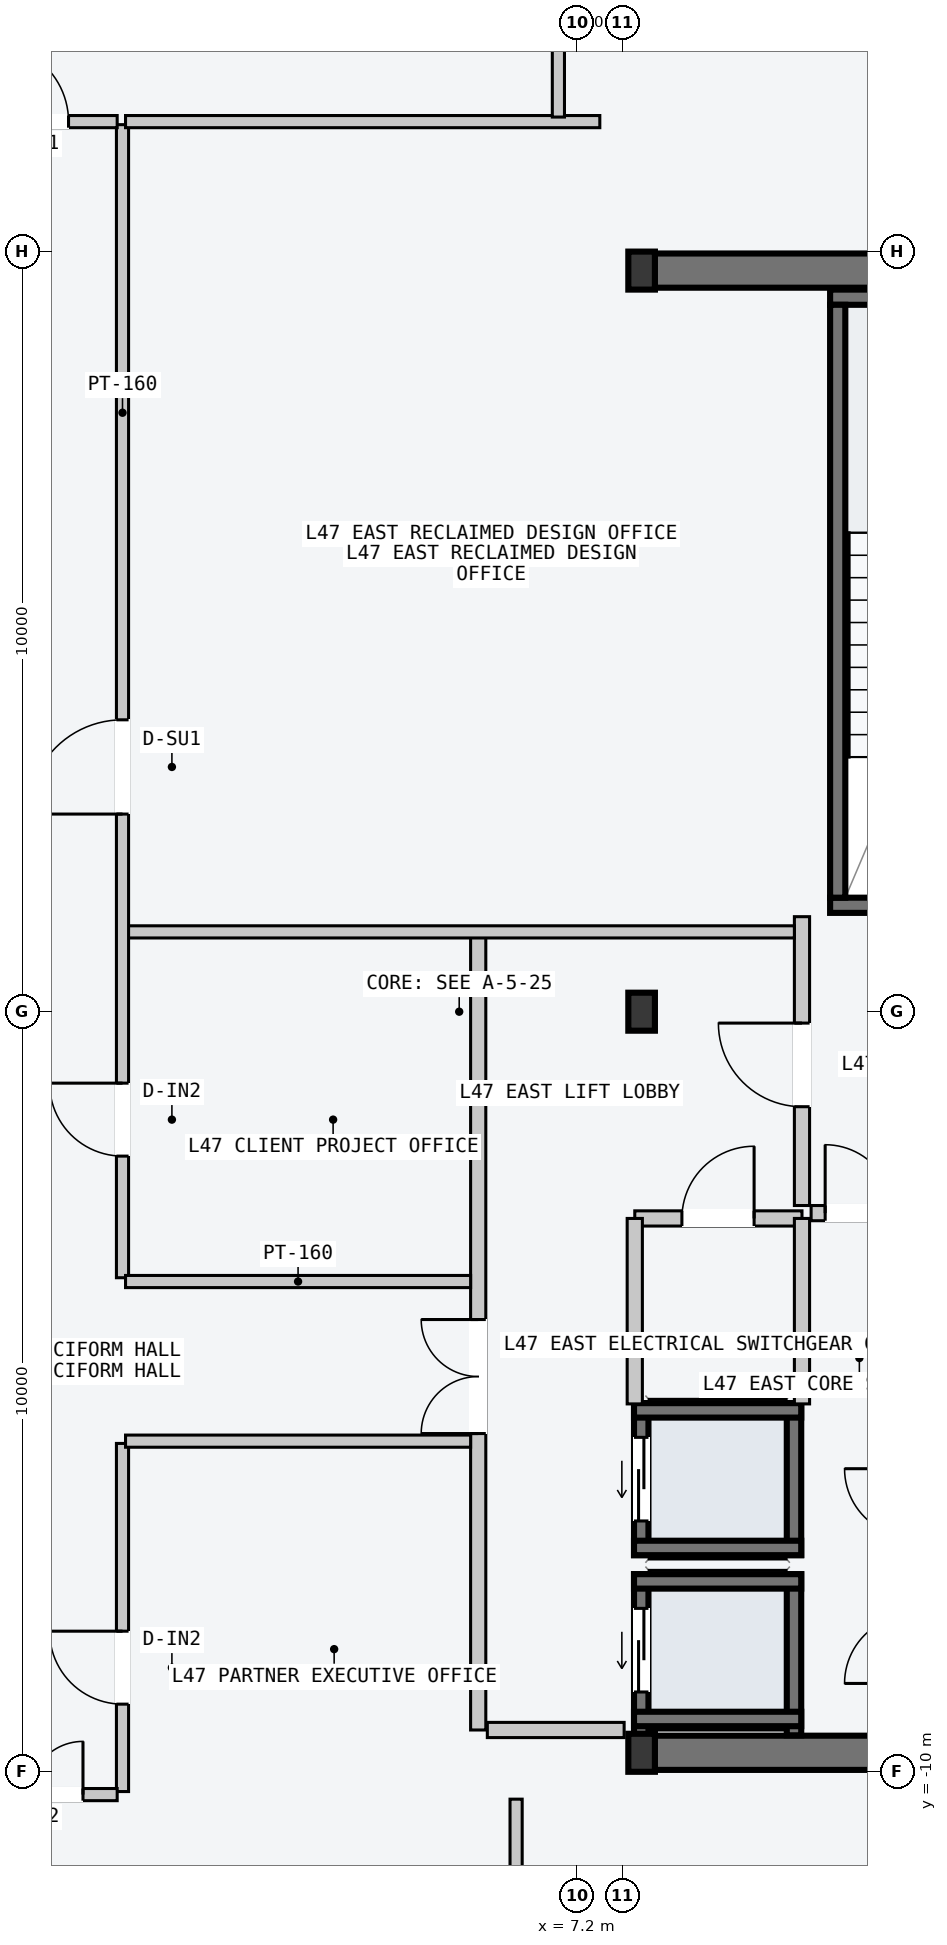
"""IFC4 building model, lengths in metres.
Left out: names, types, materials, properties, quantities, classifications, styles, units other than length and angle.
Written with IfcOpenShell. Run it as: python <this file> out.ifc"""

import sys

from ifc_helpers import new_model, si_unit, direction, frame, frame_2d, origin, origin_2d, place, context, subcontext, project, spatial, rectangle, i_section, extrude, element, fill, save


model = new_model("IFC4")
c1 = context("Model", 3, precision=1e-05, world=origin(), true_north=direction((0.0, 1.0)))
c2 = subcontext(c1, "Body", "Model", "MODEL_VIEW")
j1 = project(units=[si_unit("LENGTHUNIT", "METRE"), si_unit("PLANEANGLEUNIT", "RADIAN")], contexts=[c1])
p1 = place(None, origin())
s1 = spatial("IfcSite", under=j1, at=p1, CompositionType="ELEMENT")
p2 = place(p1, origin())
s2 = spatial("IfcBuilding", under=s1, at=p2, CompositionType="ELEMENT")
p3 = place(p2, frame((0.0, 0.0, 180.3)))
s3 = spatial("IfcBuildingStorey", under=s2, at=p3, CompositionType="ELEMENT", Elevation=180.3)
for number, where, z_axis, x_axis in (
    (1, (8.07, -9.75, -0.2), (0.0, 0.0, 1.0), (1.0, 0.0, 0.0)),
    (2, (8.07, 9.75, -0.2), (0.0, 0.0, 1.0), (1.0, 0.0, 0.0)),
):
    element("IfcWall", number, at=place(p3, frame(where, z_axis=z_axis, x_axis=x_axis)), inside=s3, PredefinedType="SHEAR", context=c2, shape_type="SweptSolid", body=[
        extrude(rectangle(XDim=6.46, YDim=0.45, at=frame_2d((3.23, 0.0))), origin(), (0.0, 0.0, 1.0), 3.6),
    ])
p4 = place(p3, frame((10.53, 1.4, -0.2), z_axis=(0.0, 0.0, 1.0), x_axis=(1.0, 0.0, 0.0)))
e3 = element("IfcWall", 3, at=p4, inside=s3, PredefinedType="SOLIDWALL", context=c2, shape_type="SweptSolid", body=[
    extrude(rectangle(XDim=3.72, YDim=0.2, at=frame_2d((1.86, 0.0))), origin(), (0.0, 0.0, 1.0), 3.6),
])
p5 = place(p4, frame((1.5, 0.0, 0.2)))
e4 = element("IfcOpeningElement", 4, at=p5, cuts=e3, PredefinedType="OPENING", context=c2, shape_type="SweptSolid", body=[
    extrude(rectangle(XDim=1.12, YDim=2.18, at=frame_2d((0.56, 1.09))), frame((0.0, 0.11, 0.0), z_axis=(0.0, -1.0, 0.0), x_axis=(1.0, 0.0, 0.0)), (0.0, 0.0, 1.0), 0.22),
])
p6 = place(p3, frame((10.53, 9.4, -0.2), z_axis=(0.0, 0.0, 1.0), x_axis=(1.0, 0.0, 0.0)))
e5 = element("IfcWall", 5, at=p6, inside=s3, PredefinedType="SOLIDWALL", context=c2, shape_type="SweptSolid", body=[
    extrude(rectangle(XDim=3.72, YDim=0.2, at=frame_2d((1.86, 0.0))), origin(), (0.0, 0.0, 1.0), 3.6),
])
p7 = place(p3, frame((10.63, 1.5, -0.2), z_axis=(0.0, 0.0, 1.0), x_axis=(0.0, 1.0, 0.0)))
e6 = element("IfcWall", 6, at=p7, inside=s3, PredefinedType="SOLIDWALL", context=c2, shape_type="SweptSolid", body=[
    extrude(rectangle(XDim=7.8, YDim=0.2, at=frame_2d((3.9, 0.0))), origin(), (0.0, 0.0, 1.0), 3.6),
])
for number, where, z_axis, x_axis in (
    (7, (8.05, -9.75, 0.0), (0.0, 0.0, 1.0), (1.0, 0.0, 0.0)),
    (8, (8.05, 0.0, 0.0), (0.0, 0.0, 1.0), (1.0, 0.0, 0.0)),
    (9, (8.05, 9.75, 0.0), (0.0, 0.0, 1.0), (1.0, 0.0, 0.0)),
):
    element("IfcColumn", number, at=place(p3, frame(where, z_axis=z_axis, x_axis=x_axis)), inside=s3, PredefinedType="COLUMN", context=c2, shape_type="SweptSolid", body=[
        extrude(i_section(OverallWidth=0.35, OverallDepth=0.5, WebThickness=0.02, FlangeThickness=0.032, at=origin_2d()), origin(), (0.0, 0.0, 1.0), 3.6),
    ])
p8 = place(p3, frame((8.045, -9.52, -0.2), z_axis=(0.0, 0.0, 1.0), x_axis=(0.0, 1.0, 0.0)))
e10 = element("IfcWall", 10, at=p8, inside=s3, PredefinedType="SOLIDWALL", context=c2, shape_type="SweptSolid", body=[
    extrude(rectangle(XDim=2.12, YDim=0.19, at=frame_2d((1.06, 0.0))), origin(), (0.0, 0.0, 1.0), 3.6),
])
p9 = place(p8, frame((0.57, 0.0, 0.2)))
e11 = element("IfcOpeningElement", 11, at=p9, cuts=e10, PredefinedType="OPENING", context=c2, shape_type="SweptSolid", body=[
    extrude(rectangle(XDim=1.1, YDim=2.2, at=frame_2d((0.55, 1.1))), frame((0.0, 0.105, 0.0), z_axis=(0.0, -1.0, 0.0), x_axis=(1.0, 0.0, 0.0)), (0.0, 0.0, 1.0), 0.21),
])
p10 = place(p3, frame((10.055, -9.52, -0.2), z_axis=(0.0, 0.0, 1.0), x_axis=(0.0, 1.0, 0.0)))
e12 = element("IfcWall", 12, at=p10, inside=s3, PredefinedType="SOLIDWALL", context=c2, shape_type="SweptSolid", body=[
    extrude(rectangle(XDim=2.12, YDim=0.19, at=frame_2d((1.06, 0.0))), origin(), (0.0, 0.0, 1.0), 3.6),
])
for number, where, z_axis, x_axis in (
    (13, (7.95, -7.495, -0.2), (0.0, 0.0, 1.0), (1.0, 0.0, 0.0)),
    (14, (7.95, -9.305, -0.2), (0.0, 0.0, 1.0), (1.0, 0.0, 0.0)),
):
    element("IfcWall", number, at=place(p3, frame(where, z_axis=z_axis, x_axis=x_axis)), inside=s3, PredefinedType="SOLIDWALL", context=c2, shape_type="SweptSolid", body=[
        extrude(rectangle(XDim=2.2, YDim=0.19, at=frame_2d((1.1, 0.0))), origin(), (0.0, 0.0, 1.0), 3.6),
    ])
p11 = place(p3, frame((8.045, -7.15, -0.2), z_axis=(0.0, 0.0, 1.0), x_axis=(0.0, 1.0, 0.0)))
e15 = element("IfcWall", 15, at=p11, inside=s3, PredefinedType="SOLIDWALL", context=c2, shape_type="SweptSolid", body=[
    extrude(rectangle(XDim=2.0, YDim=0.19, at=frame_2d((1.0, 0.0))), origin(), (0.0, 0.0, 1.0), 3.6),
])
p12 = place(p11, frame((0.45, 0.0, 0.2)))
e16 = element("IfcOpeningElement", 16, at=p12, cuts=e15, PredefinedType="OPENING", context=c2, shape_type="SweptSolid", body=[
    extrude(rectangle(XDim=1.1, YDim=2.2, at=frame_2d((0.55, 1.1))), frame((0.0, 0.105, 0.0), z_axis=(0.0, -1.0, 0.0), x_axis=(1.0, 0.0, 0.0)), (0.0, 0.0, 1.0), 0.21),
])
p13 = place(p3, frame((10.055, -7.15, -0.2), z_axis=(0.0, 0.0, 1.0), x_axis=(0.0, 1.0, 0.0)))
e17 = element("IfcWall", 17, at=p13, inside=s3, PredefinedType="SOLIDWALL", context=c2, shape_type="SweptSolid", body=[
    extrude(rectangle(XDim=2.0, YDim=0.19, at=frame_2d((1.0, 0.0))), origin(), (0.0, 0.0, 1.0), 3.6),
])
for number, where, z_axis, x_axis in (
    (18, (7.95, -5.245, -0.2), (0.0, 0.0, 1.0), (1.0, 0.0, 0.0)),
    (19, (7.95, -7.055, -0.2), (0.0, 0.0, 1.0), (1.0, 0.0, 0.0)),
):
    element("IfcWall", number, at=place(p3, frame(where, z_axis=z_axis, x_axis=x_axis)), inside=s3, PredefinedType="SOLIDWALL", context=c2, shape_type="SweptSolid", body=[
        extrude(rectangle(XDim=2.2, YDim=0.19, at=frame_2d((1.1, 0.0))), origin(), (0.0, 0.0, 1.0), 3.6),
    ])
p14 = place(p3, frame((5.9, -9.45, 0.0), z_axis=(0.0, 0.0, 1.0), x_axis=(0.0, 1.0, 0.0)))
e20 = element("IfcWall", 20, at=p14, inside=s3, PredefinedType="PARTITIONING", context=c2, shape_type="SweptSolid", body=[
    extrude(rectangle(XDim=10.5, YDim=0.2, at=frame_2d((5.25, 0.0))), origin(), (0.0, 0.0, 1.0), 3.4),
])
p15 = place(p14, frame((3.9, 0.0, 0.0)))
e21 = element("IfcOpeningElement", 21, at=p15, cuts=e20, PredefinedType="OPENING", context=c2, shape_type="SweptSolid", body=[
    extrude(rectangle(XDim=1.5, YDim=2.2, at=frame_2d((0.75, 1.1))), frame((0.0, 0.11, 0.0), z_axis=(0.0, -1.0, 0.0), x_axis=(1.0, 0.0, 0.0)), (0.0, 0.0, 1.0), 0.22),
])
p16 = place(p3, frame((6.02, -9.45, 0.0), z_axis=(0.0, 0.0, 1.0), x_axis=(1.0, 0.0, 0.0)))
e22 = element("IfcWall", 22, at=p16, inside=s3, PredefinedType="PARTITIONING", context=c2, shape_type="SweptSolid", body=[
    extrude(rectangle(XDim=1.8, YDim=0.2, at=frame_2d((0.9, 0.0))), origin(), (0.0, 0.0, 1.0), 3.4),
])
p17 = place(p3, frame((10.16, -2.55, 0.0), z_axis=(0.0, 0.0, 1.0), x_axis=(0.0, 1.0, 0.0)))
e23 = element("IfcWall", 23, at=p17, inside=s3, PredefinedType="PARTITIONING", context=c2, shape_type="SweptSolid", body=[
    extrude(rectangle(XDim=3.8, YDim=0.2, at=frame_2d((1.9, 0.0))), origin(), (0.0, 0.0, 1.0), 3.4),
])
p18 = place(p17, frame((1.3, 0.0, 0.0)))
e24 = element("IfcOpeningElement", 24, at=p18, cuts=e23, PredefinedType="OPENING", context=c2, shape_type="SweptSolid", body=[
    extrude(rectangle(XDim=1.1, YDim=2.15, at=frame_2d((0.55, 1.075))), frame((0.0, 0.11, 0.0), z_axis=(0.0, -1.0, 0.0), x_axis=(1.0, 0.0, 0.0)), (0.0, 0.0, 1.0), 0.22),
])
p19 = place(p3, frame((10.28, -2.65, 0.0), z_axis=(0.0, 0.0, 1.0), x_axis=(1.0, 0.0, 0.0)))
e25 = element("IfcWall", 25, at=p19, inside=s3, PredefinedType="PARTITIONING", context=c2, shape_type="SweptSolid", body=[
    extrude(rectangle(XDim=1.27, YDim=0.2, at=frame_2d((0.635, 0.0))), origin(), (0.0, 0.0, 1.0), 3.4),
])
p20 = place(p19, frame((0.185, 0.0, 0.0)))
e26 = element("IfcOpeningElement", 26, at=p20, cuts=e25, PredefinedType="OPENING", context=c2, shape_type="SweptSolid", body=[
    extrude(rectangle(XDim=0.9, YDim=2.15, at=frame_2d((0.45, 1.075))), frame((0.0, 0.11, 0.0), z_axis=(0.0, -1.0, 0.0), x_axis=(1.0, 0.0, 0.0)), (0.0, 0.0, 1.0), 0.22),
])
p21 = place(p3, frame((7.96, -2.72, 0.0), z_axis=(0.0, 0.0, 1.0), x_axis=(1.0, 0.0, 0.0)))
e27 = element("IfcWall", 27, at=p21, inside=s3, PredefinedType="PARTITIONING", context=c2, shape_type="SweptSolid", body=[
    extrude(rectangle(XDim=2.2, YDim=0.2, at=frame_2d((1.1, 0.0))), origin(), (0.0, 0.0, 1.0), 3.4),
])
p22 = place(p21, frame((0.62, 0.0, 0.0)))
e28 = element("IfcOpeningElement", 28, at=p22, cuts=e27, PredefinedType="OPENING", context=c2, shape_type="SweptSolid", body=[
    extrude(rectangle(XDim=0.95, YDim=2.1, at=frame_2d((0.475, 1.05))), frame((0.0, 0.11, 0.0), z_axis=(0.0, -1.0, 0.0), x_axis=(1.0, 0.0, 0.0)), (0.0, 0.0, 1.0), 0.22),
])
for number, where, z_axis, x_axis in (
    (29, (7.96, -5.16, 0.0), (0.0, 0.0, 1.0), (0.0, 1.0, 0.0)),
    (30, (10.16, -5.16, 0.0), (0.0, 0.0, 1.0), (0.0, 1.0, 0.0)),
):
    element("IfcWall", number, at=place(p3, frame(where, z_axis=z_axis, x_axis=x_axis)), inside=s3, PredefinedType="PARTITIONING", context=c2, shape_type="SweptSolid", body=[
        extrude(rectangle(XDim=2.44, YDim=0.2, at=frame_2d((1.22, 0.0))), origin(), (0.0, 0.0, 1.0), 3.4),
    ])
p23 = place(p3, frame((1.26, 1.05, 0.0), z_axis=(0.0, 0.0, 1.0), x_axis=(1.0, 0.0, 0.0)))
e31 = element("IfcWall", 31, at=p23, inside=s3, PredefinedType="PARTITIONING", context=c2, shape_type="SweptSolid", body=[
    extrude(rectangle(XDim=8.8, YDim=0.16, at=frame_2d((4.4, 0.0))), origin(), (0.0, 0.0, 1.0), 3.4),
])
p24 = place(p3, frame((1.22, -3.5, 0.0), z_axis=(0.0, 0.0, 1.0), x_axis=(0.0, 1.0, 0.0)))
e32 = element("IfcWall", 32, at=p24, inside=s3, PredefinedType="PARTITIONING", context=c2, shape_type="SweptSolid", body=[
    extrude(rectangle(XDim=15.17, YDim=0.16, at=frame_2d((7.585, 0.0))), origin(), (0.0, 0.0, 1.0), 3.4),
])
p25 = place(p24, frame((6.1, 0.0, 0.0)))
e33 = element("IfcOpeningElement", 33, at=p25, cuts=e32, PredefinedType="OPENING", context=c2, shape_type="SweptSolid", body=[
    extrude(rectangle(XDim=1.24, YDim=2.24, at=frame_2d((0.62, 1.12))), frame((0.0, 0.09, 0.0), z_axis=(0.0, -1.0, 0.0), x_axis=(1.0, 0.0, 0.0)), (0.0, 0.0, 1.0), 0.18),
])
p26 = place(p24, frame((1.6, 0.0, 0.0)))
e34 = element("IfcOpeningElement", 34, at=p26, cuts=e32, PredefinedType="OPENING", context=c2, shape_type="SweptSolid", body=[
    extrude(rectangle(XDim=0.96, YDim=2.18, at=frame_2d((0.48, 1.09))), frame((0.0, 0.09, 0.0), z_axis=(0.0, -1.0, 0.0), x_axis=(1.0, 0.0, 0.0)), (0.0, 0.0, 1.0), 0.18),
])
p27 = place(p3, frame((1.26, 11.71, 0.0), z_axis=(0.0, 0.0, 1.0), x_axis=(1.0, 0.0, 0.0)))
e35 = element("IfcWall", 35, at=p27, inside=s3, PredefinedType="PARTITIONING", context=c2, shape_type="SweptSolid", body=[
    extrude(rectangle(XDim=6.24, YDim=0.16, at=frame_2d((3.12, 0.0))), origin(), (0.0, 0.0, 1.0), 3.4),
])
p28 = place(p3, frame((1.26, -3.55, 0.0), z_axis=(0.0, 0.0, 1.0), x_axis=(1.0, 0.0, 0.0)))
e36 = element("IfcWall", 36, at=p28, inside=s3, PredefinedType="PARTITIONING", context=c2, shape_type="SweptSolid", body=[
    extrude(rectangle(XDim=4.54, YDim=0.16, at=frame_2d((2.27, 0.0))), origin(), (0.0, 0.0, 1.0), 3.4),
])
p29 = place(p3, frame((1.22, -10.26, 0.0), z_axis=(0.0, 0.0, 1.0), x_axis=(0.0, 1.0, 0.0)))
e37 = element("IfcWall", 37, at=p29, inside=s3, PredefinedType="PARTITIONING", context=c2, shape_type="SweptSolid", body=[
    extrude(rectangle(XDim=4.58, YDim=0.16, at=frame_2d((2.29, 0.0))), origin(), (0.0, 0.0, 1.0), 3.4),
])
p30 = place(p29, frame((1.15, 0.0, 0.0)))
e38 = element("IfcOpeningElement", 38, at=p30, cuts=e37, PredefinedType="OPENING", context=c2, shape_type="SweptSolid", body=[
    extrude(rectangle(XDim=0.96, YDim=2.18, at=frame_2d((0.48, 1.09))), frame((0.0, 0.09, 0.0), z_axis=(0.0, -1.0, 0.0), x_axis=(1.0, 0.0, 0.0)), (0.0, 0.0, 1.0), 0.18),
])
p31 = place(p3, frame((1.26, -5.65, 0.0), z_axis=(0.0, 0.0, 1.0), x_axis=(1.0, 0.0, 0.0)))
e39 = element("IfcWall", 39, at=p31, inside=s3, PredefinedType="PARTITIONING", context=c2, shape_type="SweptSolid", body=[
    extrude(rectangle(XDim=4.54, YDim=0.16, at=frame_2d((2.27, 0.0))), origin(), (0.0, 0.0, 1.0), 3.4),
])
p32 = place(p3, frame((6.955, 11.77, 0.0), z_axis=(0.0, 0.0, 1.0), x_axis=(0.0, 1.0, 0.0)))
e40 = element("IfcWall", 40, at=p32, inside=s3, PredefinedType="PARTITIONING", context=c2, shape_type="SweptSolid", body=[
    extrude(rectangle(XDim=6.79, YDim=0.16, at=frame_2d((3.395, 0.0))), origin(), (0.0, 0.0, 1.0), 3.4),
])
p33 = place(p32, frame((1.15, 0.0, 0.0)))
e41 = element("IfcOpeningElement", 41, at=p33, cuts=e40, PredefinedType="OPENING", context=c2, shape_type="SweptSolid", body=[
    extrude(rectangle(XDim=0.96, YDim=2.18, at=frame_2d((0.48, 1.09))), frame((0.0, 0.09, 0.0), z_axis=(0.0, -1.0, 0.0), x_axis=(1.0, 0.0, 0.0)), (0.0, 0.0, 1.0), 0.18),
])
p34 = place(p3, frame((-1.15, 11.71, 0.0), z_axis=(0.0, 0.0, 1.0), x_axis=(1.0, 0.0, 0.0)))
e42 = element("IfcWall", 42, at=p34, inside=s3, PredefinedType="PARTITIONING", context=c2, shape_type="SweptSolid", body=[
    extrude(rectangle(XDim=2.3, YDim=0.16, at=frame_2d((1.15, 0.0))), origin(), (0.0, 0.0, 1.0), 3.4),
])
p35 = place(p34, frame((0.64, 0.0, 0.0)))
e43 = element("IfcOpeningElement", 43, at=p35, cuts=e42, PredefinedType="OPENING", context=c2, shape_type="SweptSolid", body=[
    extrude(rectangle(XDim=1.02, YDim=2.2, at=frame_2d((0.51, 1.1))), frame((0.0, 0.09, 0.0), z_axis=(0.0, -1.0, 0.0), x_axis=(1.0, 0.0, 0.0)), (0.0, 0.0, 1.0), 0.18),
])
p36 = place(p3, frame((6.399, -18.56, 0.0), z_axis=(0.0, 0.0, 1.0), x_axis=(0.0, 1.0, 0.0)))
e44 = element("IfcWall", 44, at=p36, inside=s3, PredefinedType="PARTITIONING", context=c2, shape_type="SweptSolid", body=[
    extrude(rectangle(XDim=8.2, YDim=0.16, at=frame_2d((4.1, 0.0))), origin(), (0.0, 0.0, 1.0), 3.4),
])
p37 = place(p36, frame((1.34, 0.0, 0.0)))
e45 = element("IfcOpeningElement", 45, at=p37, cuts=e44, PredefinedType="OPENING", context=c2, shape_type="SweptSolid", body=[
    extrude(rectangle(XDim=0.96, YDim=2.18, at=frame_2d((0.48, 1.09))), frame((0.0, 0.09, 0.0), z_axis=(0.0, -1.0, 0.0), x_axis=(1.0, 0.0, 0.0)), (0.0, 0.0, 1.0), 0.18),
])
p38 = place(p3, frame((-1.15, -10.3, 0.0), z_axis=(0.0, 0.0, 1.0), x_axis=(1.0, 0.0, 0.0)))
e46 = element("IfcWall", 46, at=p38, inside=s3, PredefinedType="PARTITIONING", context=c2, shape_type="SweptSolid", body=[
    extrude(rectangle(XDim=2.3, YDim=0.16, at=frame_2d((1.15, 0.0))), origin(), (0.0, 0.0, 1.0), 3.4),
])
p39 = place(p38, frame((0.45, 0.0, 0.0)))
e47 = element("IfcOpeningElement", 47, at=p39, cuts=e46, PredefinedType="OPENING", context=c2, shape_type="SweptSolid", body=[
    extrude(rectangle(XDim=1.4, YDim=2.2, at=frame_2d((0.7, 1.1))), frame((0.0, 0.09, 0.0), z_axis=(0.0, -1.0, 0.0), x_axis=(1.0, 0.0, 0.0)), (0.0, 0.0, 1.0), 0.18),
])
p40 = place(p9, origin())
e48 = element("IfcDoor", 48, at=p40, inside=s3, OperationType="SLIDING_TO_LEFT", PredefinedType="DOOR", context=c2, shape_type="SweptSolid", body=[
    extrude(rectangle(XDim=1.1, YDim=2.2, at=frame_2d((0.55, 1.1))), frame((0.0, 0.025, 0.0), z_axis=(0.0, -1.0, 0.0), x_axis=(1.0, 0.0, 0.0)), (0.0, 0.0, 1.0), 0.05),
])
fill(e11, e48)
p41 = place(p12, origin())
e49 = element("IfcDoor", 49, at=p41, inside=s3, OperationType="SLIDING_TO_LEFT", PredefinedType="DOOR", context=c2, shape_type="SweptSolid", body=[
    extrude(rectangle(XDim=1.1, YDim=2.2, at=frame_2d((0.55, 1.1))), frame((0.0, 0.025, 0.0), z_axis=(0.0, -1.0, 0.0), x_axis=(1.0, 0.0, 0.0)), (0.0, 0.0, 1.0), 0.05),
])
fill(e16, e49)
p42 = place(p15, origin())
e50 = element("IfcDoor", 50, at=p42, inside=s3, OperationType="DOUBLE_DOOR_SINGLE_SWING", PredefinedType="DOOR", context=c2, shape_type="SweptSolid", body=[
    extrude(rectangle(XDim=1.5, YDim=2.2, at=frame_2d((0.75, 1.1))), frame((0.0, 0.025, 0.0), z_axis=(0.0, -1.0, 0.0), x_axis=(1.0, 0.0, 0.0)), (0.0, 0.0, 1.0), 0.05),
])
fill(e21, e50)
p43 = place(p18, origin())
e51 = element("IfcDoor", 51, at=p43, inside=s3, OperationType="SINGLE_SWING_RIGHT", PredefinedType="DOOR", context=c2, shape_type="SweptSolid", body=[
    extrude(rectangle(XDim=1.1, YDim=2.15, at=frame_2d((0.55, 1.075))), frame((0.0, 0.025, 0.0), z_axis=(0.0, -1.0, 0.0), x_axis=(1.0, 0.0, 0.0)), (0.0, 0.0, 1.0), 0.05),
])
fill(e24, e51)
p44 = place(p20, origin())
e52 = element("IfcDoor", 52, at=p44, inside=s3, OperationType="SINGLE_SWING_LEFT", PredefinedType="DOOR", context=c2, shape_type="SweptSolid", body=[
    extrude(rectangle(XDim=0.9, YDim=2.15, at=frame_2d((0.45, 1.075))), frame((0.0, 0.025, 0.0), z_axis=(0.0, -1.0, 0.0), x_axis=(1.0, 0.0, 0.0)), (0.0, 0.0, 1.0), 0.05),
])
fill(e26, e52)
p45 = place(p22, origin())
e53 = element("IfcDoor", 53, at=p45, inside=s3, OperationType="SINGLE_SWING_RIGHT", PredefinedType="DOOR", context=c2, shape_type="SweptSolid", body=[
    extrude(rectangle(XDim=0.95, YDim=2.1, at=frame_2d((0.475, 1.05))), frame((0.0, 0.025, 0.0), z_axis=(0.0, -1.0, 0.0), x_axis=(1.0, 0.0, 0.0)), (0.0, 0.0, 1.0), 0.05),
])
fill(e28, e53)
p46 = place(p25, origin())
e54 = element("IfcDoor", 54, at=p46, inside=s3, OperationType="SINGLE_SWING_LEFT", PredefinedType="DOOR", context=c2, shape_type="SweptSolid", body=[
    extrude(rectangle(XDim=1.24, YDim=2.24, at=frame_2d((0.62, 1.12))), frame((0.0, 0.025, 0.0), z_axis=(0.0, -1.0, 0.0), x_axis=(1.0, 0.0, 0.0)), (0.0, 0.0, 1.0), 0.05),
])
fill(e33, e54)
p47 = place(p26, origin())
e55 = element("IfcDoor", 55, at=p47, inside=s3, OperationType="SINGLE_SWING_RIGHT", PredefinedType="DOOR", context=c2, shape_type="SweptSolid", body=[
    extrude(rectangle(XDim=0.96, YDim=2.18, at=frame_2d((0.48, 1.09))), frame((0.0, 0.025, 0.0), z_axis=(0.0, -1.0, 0.0), x_axis=(1.0, 0.0, 0.0)), (0.0, 0.0, 1.0), 0.05),
])
fill(e34, e55)
p48 = place(p30, origin())
e56 = element("IfcDoor", 56, at=p48, inside=s3, OperationType="SINGLE_SWING_RIGHT", PredefinedType="DOOR", context=c2, shape_type="SweptSolid", body=[
    extrude(rectangle(XDim=0.96, YDim=2.18, at=frame_2d((0.48, 1.09))), frame((0.0, 0.025, 0.0), z_axis=(0.0, -1.0, 0.0), x_axis=(1.0, 0.0, 0.0)), (0.0, 0.0, 1.0), 0.05),
])
fill(e38, e56)
p49 = place(p35, origin())
e57 = element("IfcDoor", 57, at=p49, inside=s3, OperationType="SINGLE_SWING_LEFT", PredefinedType="DOOR", context=c2, shape_type="SweptSolid", body=[
    extrude(rectangle(XDim=1.02, YDim=2.2, at=frame_2d((0.51, 1.1))), frame((0.0, 0.025, 0.0), z_axis=(0.0, -1.0, 0.0), x_axis=(1.0, 0.0, 0.0)), (0.0, 0.0, 1.0), 0.05),
])
fill(e43, e57)
p50 = place(p39, origin())
e58 = element("IfcDoor", 58, at=p50, inside=s3, OperationType="DOUBLE_DOOR_SINGLE_SWING", PredefinedType="DOOR", context=c2, shape_type="SweptSolid", body=[
    extrude(rectangle(XDim=1.4, YDim=2.2, at=frame_2d((0.7, 1.1))), frame((0.0, 0.025, 0.0), z_axis=(0.0, -1.0, 0.0), x_axis=(1.0, 0.0, 0.0)), (0.0, 0.0, 1.0), 0.05),
])
fill(e47, e58)
save(model, sys.argv[1])
